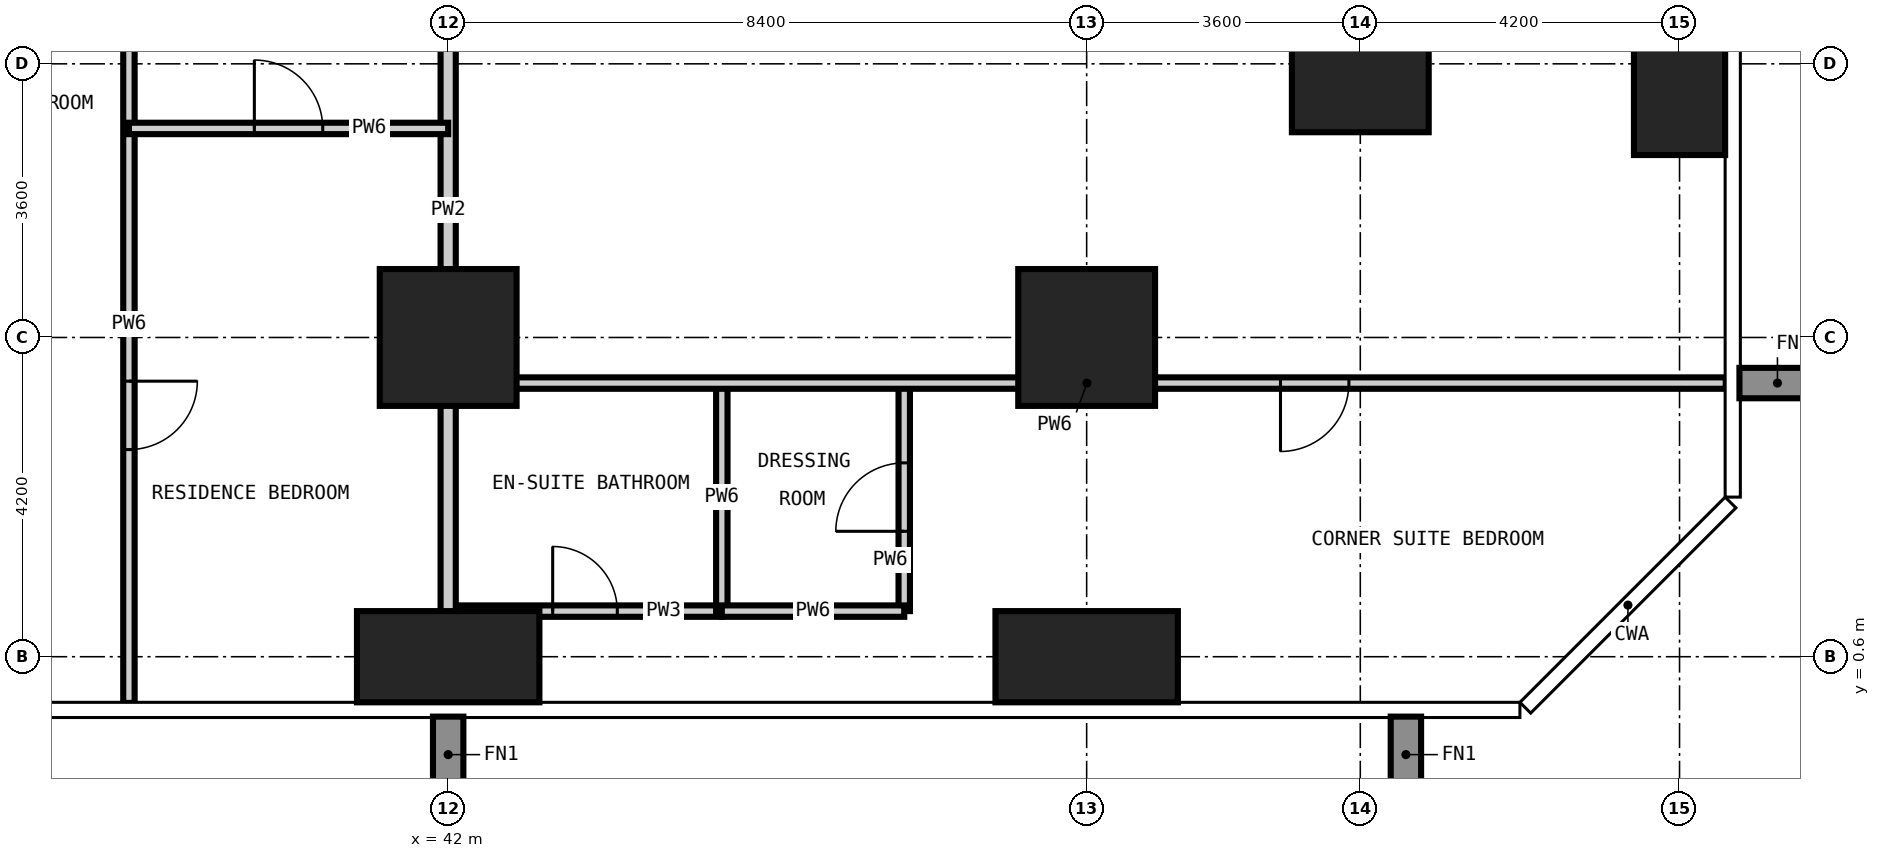
"""IFC4 building model, lengths in metres.
Left out: names, types, materials, properties, quantities, classifications, styles, units other than length and angle.
Written with IfcOpenShell. Run it as: python <this file> out.ifc"""

import sys

from ifc_helpers import new_model, si_unit, direction, frame, frame_2d, origin, origin_2d, place, context, subcontext, project, spatial, rectangle, extrude, element, fill, save


model = new_model("IFC4")
c1 = context("Model", 3, precision=1e-05, world=origin(), true_north=direction((0.0, 1.0)))
c2 = subcontext(c1, "Body", "Model", "MODEL_VIEW")
j1 = project(units=[si_unit("LENGTHUNIT", "METRE"), si_unit("PLANEANGLEUNIT", "RADIAN")], contexts=[c1])
p1 = place(None, origin())
s1 = spatial("IfcSite", under=j1, at=p1, CompositionType="ELEMENT")
p2 = place(p1, origin())
s2 = spatial("IfcBuilding", under=s1, at=p2, CompositionType="ELEMENT")
p3 = place(p2, frame((0.0, 0.0, 45.0)))
s3 = spatial("IfcBuildingStorey", under=s2, at=p3, CompositionType="ELEMENT", Elevation=45.0)
p4 = place(p3, frame((42.0, 0.6, -0.35), z_axis=(0.0, 0.0, 1.0), x_axis=(1.0, 0.0, 0.0)))
e1 = element("IfcColumn", 1, at=p4, inside=s3, PredefinedType="COLUMN", context=c2, shape_type="SweptSolid", body=[
    extrude(rectangle(XDim=2.4, YDim=1.2, at=origin_2d()), origin(), (0.0, 0.0, 1.0), 3.6),
])
p5 = place(p3, frame((42.0, 4.8, -0.35), z_axis=(0.0, 0.0, 1.0), x_axis=(1.0, 0.0, 0.0)))
e2 = element("IfcColumn", 2, at=p5, inside=s3, PredefinedType="COLUMN", context=c2, shape_type="SweptSolid", body=[
    extrude(rectangle(XDim=1.8, YDim=1.8, at=origin_2d()), origin(), (0.0, 0.0, 1.0), 3.6),
])
p6 = place(p3, frame((50.4, 0.6, -0.35), z_axis=(0.0, 0.0, 1.0), x_axis=(1.0, 0.0, 0.0)))
e3 = element("IfcColumn", 3, at=p6, inside=s3, PredefinedType="COLUMN", context=c2, shape_type="SweptSolid", body=[
    extrude(rectangle(XDim=2.4, YDim=1.2, at=origin_2d()), origin(), (0.0, 0.0, 1.0), 3.6),
])
for number, where, z_axis, x_axis in (
    (4, (50.4, 4.8, -0.35), (0.0, 0.0, 1.0), (1.0, 0.0, 0.0)),
    (5, (54.0, 8.4, -0.35), (0.0, 0.0, 1.0), (1.0, 0.0, 0.0)),
):
    element("IfcColumn", number, at=place(p3, frame(where, z_axis=z_axis, x_axis=x_axis)), inside=s3, PredefinedType="COLUMN", context=c2, shape_type="SweptSolid", body=[
        extrude(rectangle(XDim=1.8, YDim=1.8, at=origin_2d()), origin(), (0.0, 0.0, 1.0), 3.6),
    ])
p7 = place(p3, frame((58.2, 8.4, -0.35), z_axis=(0.0, 0.0, 1.0), x_axis=(1.0, 0.0, 0.0)))
e6 = element("IfcColumn", 6, at=p7, inside=s3, PredefinedType="COLUMN", context=c2, shape_type="SweptSolid", body=[
    extrude(rectangle(XDim=1.2, YDim=2.4, at=origin_2d()), origin(), (0.0, 0.0, 1.0), 3.6),
])
p8 = place(p3, frame((42.0, 1.2, 0.0), z_axis=(0.0, 0.0, 1.0), x_axis=(1.0, 0.0, 0.0)))
e7 = element("IfcWall", 7, at=p8, inside=s3, PredefinedType="PARTITIONING", context=c2, shape_type="SweptSolid", body=[
    extrude(rectangle(XDim=3.6, YDim=0.15, at=frame_2d((1.8, 0.0))), origin(), (0.0, 0.0, 1.0), 3.25),
])
p9 = place(p8, frame((1.375, 0.0, 0.0)))
e8 = element("IfcOpeningElement", 8, at=p9, cuts=e7, PredefinedType="OPENING", context=c2, shape_type="SweptSolid", body=[
    extrude(rectangle(XDim=0.85, YDim=2.1, at=frame_2d((0.425, 1.05))), frame((0.0, 0.085, 0.0), z_axis=(0.0, -1.0, 0.0), x_axis=(1.0, 0.0, 0.0)), (0.0, 0.0, 1.0), 0.17),
])
p10 = place(p3, frame((42.0, -0.008, 0.0), z_axis=(0.0, 0.0, 1.0), x_axis=(0.0, 1.0, 0.0)))
e9 = element("IfcWall", 9, at=p10, inside=s3, PredefinedType="PARTITIONING", context=c2, shape_type="SweptSolid", body=[
    extrude(rectangle(XDim=12.958, YDim=0.2, at=frame_2d((6.479, 0.0))), origin(), (0.0, 0.0, 1.0), 3.25),
])
p11 = place(p3, frame((37.8, -0.008, 0.0), z_axis=(0.0, 0.0, 1.0), x_axis=(0.0, 1.0, 0.0)))
e10 = element("IfcWall", 10, at=p11, inside=s3, PredefinedType="PARTITIONING", context=c2, shape_type="SweptSolid", body=[
    extrude(rectangle(XDim=9.958, YDim=0.15, at=frame_2d((4.979, 0.0))), origin(), (0.0, 0.0, 1.0), 3.25),
])
p12 = place(p11, frame((3.333, 0.0, 0.0)))
e11 = element("IfcOpeningElement", 11, at=p12, cuts=e10, PredefinedType="OPENING", context=c2, shape_type="SweptSolid", body=[
    extrude(rectangle(XDim=0.9, YDim=2.1, at=frame_2d((0.45, 1.05))), frame((0.0, 0.085, 0.0), z_axis=(0.0, -1.0, 0.0), x_axis=(1.0, 0.0, 0.0)), (0.0, 0.0, 1.0), 0.17),
])
p13 = place(p3, frame((45.6, 1.2, 0.0), z_axis=(0.0, 0.0, 1.0), x_axis=(0.0, 1.0, 0.0)))
e12 = element("IfcWall", 12, at=p13, inside=s3, PredefinedType="PARTITIONING", context=c2, shape_type="SweptSolid", body=[
    extrude(rectangle(XDim=3.0, YDim=0.15, at=frame_2d((1.5, 0.0))), origin(), (0.0, 0.0, 1.0), 3.25),
])
p14 = place(p3, frame((48.0, 1.2, 0.0), z_axis=(0.0, 0.0, 1.0), x_axis=(0.0, 1.0, 0.0)))
e13 = element("IfcWall", 13, at=p14, inside=s3, PredefinedType="PARTITIONING", context=c2, shape_type="SweptSolid", body=[
    extrude(rectangle(XDim=3.0, YDim=0.15, at=frame_2d((1.5, 0.0))), origin(), (0.0, 0.0, 1.0), 3.25),
])
p15 = place(p14, frame((1.05, 0.0, 0.0)))
e14 = element("IfcOpeningElement", 14, at=p15, cuts=e13, PredefinedType="OPENING", context=c2, shape_type="SweptSolid", body=[
    extrude(rectangle(XDim=0.9, YDim=2.1, at=frame_2d((0.45, 1.05))), frame((0.0, 0.085, 0.0), z_axis=(0.0, -1.0, 0.0), x_axis=(1.0, 0.0, 0.0)), (0.0, 0.0, 1.0), 0.17),
])
p16 = place(p3, frame((45.6, 1.2, 0.0), z_axis=(0.0, 0.0, 1.0), x_axis=(1.0, 0.0, 0.0)))
e15 = element("IfcWall", 15, at=p16, inside=s3, PredefinedType="PARTITIONING", context=c2, shape_type="SweptSolid", body=[
    extrude(rectangle(XDim=2.4, YDim=0.15, at=frame_2d((1.2, 0.0))), origin(), (0.0, 0.0, 1.0), 3.25),
])
p17 = place(p3, frame((42.0, 4.2, 0.0), z_axis=(0.0, 0.0, 1.0), x_axis=(1.0, 0.0, 0.0)))
e16 = element("IfcWall", 16, at=p17, inside=s3, PredefinedType="PARTITIONING", context=c2, shape_type="SweptSolid", body=[
    extrude(rectangle(XDim=16.808, YDim=0.15, at=frame_2d((8.404, 0.0))), origin(), (0.0, 0.0, 1.0), 3.25),
])
p18 = place(p17, frame((10.95, 0.0, 0.0)))
e17 = element("IfcOpeningElement", 17, at=p18, cuts=e16, PredefinedType="OPENING", context=c2, shape_type="SweptSolid", body=[
    extrude(rectangle(XDim=0.9, YDim=2.1, at=frame_2d((0.45, 1.05))), frame((0.0, 0.085, 0.0), z_axis=(0.0, -1.0, 0.0), x_axis=(1.0, 0.0, 0.0)), (0.0, 0.0, 1.0), 0.17),
])
p19 = place(p3, frame((37.8, 7.55, 0.0), z_axis=(0.0, 0.0, 1.0), x_axis=(1.0, 0.0, 0.0)))
e18 = element("IfcWall", 18, at=p19, inside=s3, PredefinedType="PARTITIONING", context=c2, shape_type="SweptSolid", body=[
    extrude(rectangle(XDim=4.2, YDim=0.15, at=frame_2d((2.1, 0.0))), origin(), (0.0, 0.0, 1.0), 3.25),
])
p20 = place(p19, frame((1.65, 0.0, 0.0)))
e19 = element("IfcOpeningElement", 19, at=p20, cuts=e18, PredefinedType="OPENING", context=c2, shape_type="SweptSolid", body=[
    extrude(rectangle(XDim=0.9, YDim=2.1, at=frame_2d((0.45, 1.05))), frame((0.0, 0.085, 0.0), z_axis=(0.0, -1.0, 0.0), x_axis=(1.0, 0.0, 0.0)), (0.0, 0.0, 1.0), 0.17),
])
p21 = place(p20, origin())
e20 = element("IfcDoor", 20, at=p21, inside=s3, OperationType="SINGLE_SWING_LEFT", PredefinedType="DOOR", context=c2, shape_type="SweptSolid", body=[
    extrude(rectangle(XDim=0.9, YDim=2.1, at=frame_2d((0.45, 1.05))), frame((0.0, 0.025, 0.0), z_axis=(0.0, -1.0, 0.0), x_axis=(1.0, 0.0, 0.0)), (0.0, 0.0, 1.0), 0.05),
])
fill(e19, e20)
p22 = place(p12, frame((0.9, 0.0, 0.0), z_axis=(0.0, 0.0, 1.0), x_axis=(-1.0, 0.0, 0.0)))
e21 = element("IfcDoor", 21, at=p22, inside=s3, OperationType="SINGLE_SWING_LEFT", PredefinedType="DOOR", context=c2, shape_type="SweptSolid", body=[
    extrude(rectangle(XDim=0.9, YDim=2.1, at=frame_2d((0.45, 1.05))), frame((0.0, 0.025, 0.0), z_axis=(0.0, -1.0, 0.0), x_axis=(1.0, 0.0, 0.0)), (0.0, 0.0, 1.0), 0.05),
])
fill(e11, e21)
p23 = place(p18, frame((0.9, 0.0, 0.0), z_axis=(0.0, 0.0, 1.0), x_axis=(-1.0, 0.0, 0.0)))
e22 = element("IfcDoor", 22, at=p23, inside=s3, OperationType="SINGLE_SWING_RIGHT", PredefinedType="DOOR", context=c2, shape_type="SweptSolid", body=[
    extrude(rectangle(XDim=0.9, YDim=2.1, at=frame_2d((0.45, 1.05))), frame((0.0, 0.025, 0.0), z_axis=(0.0, -1.0, 0.0), x_axis=(1.0, 0.0, 0.0)), (0.0, 0.0, 1.0), 0.05),
])
fill(e17, e22)
p24 = place(p9, origin())
e23 = element("IfcDoor", 23, at=p24, inside=s3, OperationType="SINGLE_SWING_LEFT", PredefinedType="DOOR", context=c2, shape_type="SweptSolid", body=[
    extrude(rectangle(XDim=0.85, YDim=2.1, at=frame_2d((0.425, 1.05))), frame((0.0, 0.025, 0.0), z_axis=(0.0, -1.0, 0.0), x_axis=(1.0, 0.0, 0.0)), (0.0, 0.0, 1.0), 0.05),
])
fill(e8, e23)
p25 = place(p15, origin())
e24 = element("IfcDoor", 24, at=p25, inside=s3, OperationType="SINGLE_SWING_LEFT", PredefinedType="DOOR", context=c2, shape_type="SweptSolid", body=[
    extrude(rectangle(XDim=0.9, YDim=2.1, at=frame_2d((0.45, 1.05))), frame((0.0, 0.025, 0.0), z_axis=(0.0, -1.0, 0.0), x_axis=(1.0, 0.0, 0.0)), (0.0, 0.0, 1.0), 0.05),
])
fill(e14, e24)
save(model, sys.argv[1])
